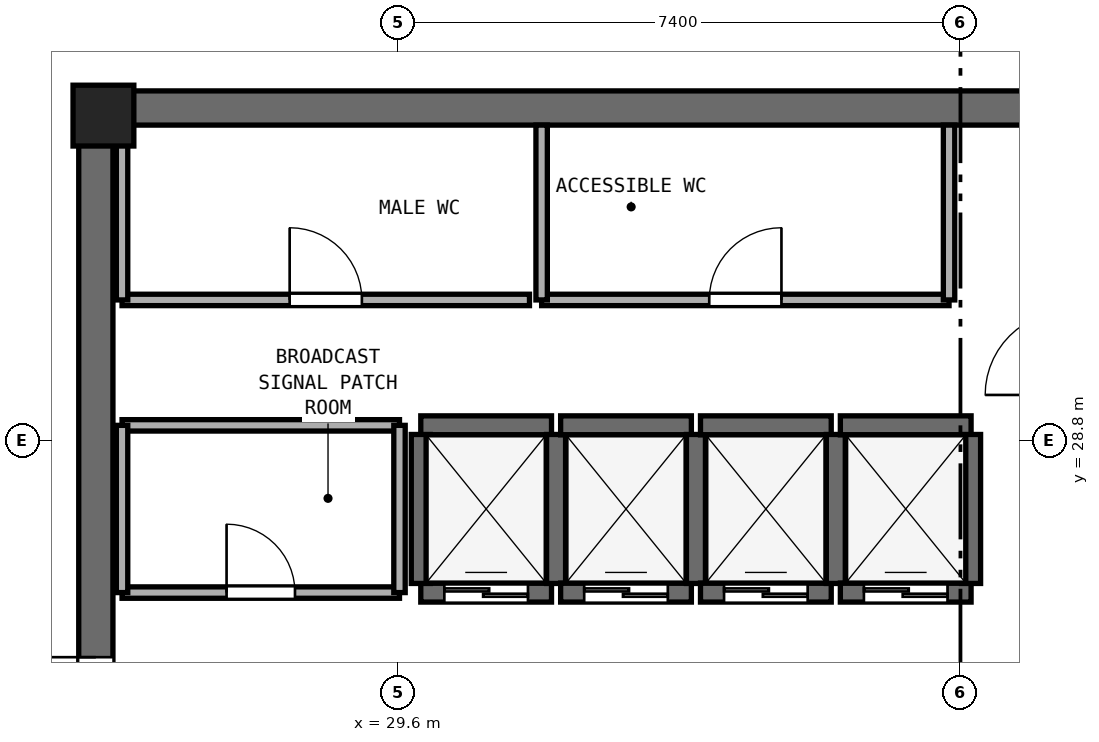
"""IFC4 building model, lengths in metres.
Left out: names, types, materials, properties, quantities, classifications, styles, units other than length and angle.
Written with IfcOpenShell. Run it as: python <this file> out.ifc"""

import sys

from ifc_helpers import new_model, si_unit, direction, frame, frame_2d, origin, origin_2d, place, context, subcontext, project, spatial, rectangle, extrude, element, fill, save


model = new_model("IFC4")
c1 = context("Model", 3, precision=1e-05, world=origin(), true_north=direction((0.0, 1.0)))
c2 = subcontext(c1, "Body", "Model", "MODEL_VIEW")
j1 = project(units=[si_unit("LENGTHUNIT", "METRE"), si_unit("PLANEANGLEUNIT", "RADIAN")], contexts=[c1])
p1 = place(None, origin())
s1 = spatial("IfcSite", under=j1, at=p1, CompositionType="ELEMENT")
p2 = place(p1, origin())
s2 = spatial("IfcBuilding", under=s1, at=p2, CompositionType="ELEMENT")
p3 = place(p2, frame((0.0, 0.0, 228.8)))
s3 = spatial("IfcBuildingStorey", under=s2, at=p3, CompositionType="ELEMENT", Elevation=228.8)
p4 = place(p3, frame((25.4, 33.175, 0.0), z_axis=(0.0, 0.0, 1.0), x_axis=(1.0, 0.0, 0.0)))
e1 = element("IfcWall", 1, at=p4, inside=s3, PredefinedType="SHEAR", context=c2, shape_type="SweptSolid", body=[
    extrude(rectangle(XDim=23.2, YDim=0.45, at=frame_2d((11.6, 0.0))), origin(), (0.0, 0.0, 1.0), 3.51),
])
p5 = place(p3, frame((25.625, 17.45, 0.0), z_axis=(0.0, 0.0, 1.0), x_axis=(0.0, 1.0, 0.0)))
e2 = element("IfcWall", 2, at=p5, inside=s3, PredefinedType="SHEAR", context=c2, shape_type="SweptSolid", body=[
    extrude(rectangle(XDim=15.5, YDim=0.45, at=frame_2d((7.75, 0.0))), origin(), (0.0, 0.0, 1.0), 3.51),
])
p6 = place(p5, frame((7.0, 0.0, 0.0)))
e3 = element("IfcOpeningElement", 3, at=p6, cuts=e2, PredefinedType="OPENING", context=c2, shape_type="SweptSolid", body=[
    extrude(rectangle(XDim=1.5, YDim=2.15, at=frame_2d((0.75, 1.075))), frame((0.0, 0.235, 0.0), z_axis=(0.0, -1.0, 0.0), x_axis=(1.0, 0.0, 0.0)), (0.0, 0.0, 1.0), 0.47),
])
p7 = place(p3, frame((25.725, 33.075, 0.0), z_axis=(0.0, 0.0, 1.0), x_axis=(1.0, 0.0, 0.0)))
e4 = element("IfcColumn", 4, at=p7, inside=s3, PredefinedType="PILASTER", context=c2, shape_type="SweptSolid", body=[
    extrude(rectangle(XDim=0.8, YDim=0.8, at=origin_2d()), origin(), (0.0, 0.0, 1.0), 3.8),
])
p8 = place(p3, frame((29.9, 26.8, 0.0), z_axis=(0.0, 0.0, 1.0), x_axis=(1.0, 0.0, 0.0)))
e5 = element("IfcWall", 5, at=p8, inside=s3, PredefinedType="SHEAR", context=c2, shape_type="SweptSolid", body=[
    extrude(rectangle(XDim=1.72, YDim=0.25, at=frame_2d((0.86, 0.0))), origin(), (0.0, 0.0, 1.0), 3.51),
])
p9 = place(p8, frame((0.31, 0.0, 0.0)))
e6 = element("IfcOpeningElement", 6, at=p9, cuts=e5, PredefinedType="OPENING", context=c2, shape_type="SweptSolid", body=[
    extrude(rectangle(XDim=1.1, YDim=2.15, at=frame_2d((0.55, 1.075))), frame((0.0, 0.135, 0.0), z_axis=(0.0, -1.0, 0.0), x_axis=(1.0, 0.0, 0.0)), (0.0, 0.0, 1.0), 0.27),
])
p10 = place(p3, frame((29.9, 29.0, 0.0), z_axis=(0.0, 0.0, 1.0), x_axis=(1.0, 0.0, 0.0)))
e7 = element("IfcWall", 7, at=p10, inside=s3, PredefinedType="SHEAR", context=c2, shape_type="SweptSolid", body=[
    extrude(rectangle(XDim=1.72, YDim=0.25, at=frame_2d((0.86, 0.0))), origin(), (0.0, 0.0, 1.0), 3.51),
])
for number, where, z_axis, x_axis in (
    (8, (29.9, 26.92, 0.0), (0.0, 0.0, 1.0), (0.0, 1.0, 0.0)),
    (9, (31.68, 26.92, 0.0), (0.0, 0.0, 1.0), (0.0, 1.0, 0.0)),
):
    element("IfcWall", number, at=place(p3, frame(where, z_axis=z_axis, x_axis=x_axis)), inside=s3, PredefinedType="SHEAR", context=c2, shape_type="SweptSolid", body=[
        extrude(rectangle(XDim=1.96, YDim=0.25, at=frame_2d((0.98, 0.0))), origin(), (0.0, 0.0, 1.0), 3.51),
    ])
p11 = place(p3, frame((31.74, 26.8, 0.0), z_axis=(0.0, 0.0, 1.0), x_axis=(1.0, 0.0, 0.0)))
e10 = element("IfcWall", 10, at=p11, inside=s3, PredefinedType="SHEAR", context=c2, shape_type="SweptSolid", body=[
    extrude(rectangle(XDim=1.72, YDim=0.25, at=frame_2d((0.86, 0.0))), origin(), (0.0, 0.0, 1.0), 3.51),
])
p12 = place(p11, frame((0.31, 0.0, 0.0)))
e11 = element("IfcOpeningElement", 11, at=p12, cuts=e10, PredefinedType="OPENING", context=c2, shape_type="SweptSolid", body=[
    extrude(rectangle(XDim=1.1, YDim=2.15, at=frame_2d((0.55, 1.075))), frame((0.0, 0.135, 0.0), z_axis=(0.0, -1.0, 0.0), x_axis=(1.0, 0.0, 0.0)), (0.0, 0.0, 1.0), 0.27),
])
p13 = place(p3, frame((31.74, 29.0, 0.0), z_axis=(0.0, 0.0, 1.0), x_axis=(1.0, 0.0, 0.0)))
e12 = element("IfcWall", 12, at=p13, inside=s3, PredefinedType="SHEAR", context=c2, shape_type="SweptSolid", body=[
    extrude(rectangle(XDim=1.72, YDim=0.25, at=frame_2d((0.86, 0.0))), origin(), (0.0, 0.0, 1.0), 3.51),
])
p14 = place(p3, frame((33.52, 26.92, 0.0), z_axis=(0.0, 0.0, 1.0), x_axis=(0.0, 1.0, 0.0)))
e13 = element("IfcWall", 13, at=p14, inside=s3, PredefinedType="SHEAR", context=c2, shape_type="SweptSolid", body=[
    extrude(rectangle(XDim=1.96, YDim=0.25, at=frame_2d((0.98, 0.0))), origin(), (0.0, 0.0, 1.0), 3.51),
])
p15 = place(p3, frame((33.58, 26.8, 0.0), z_axis=(0.0, 0.0, 1.0), x_axis=(1.0, 0.0, 0.0)))
e14 = element("IfcWall", 14, at=p15, inside=s3, PredefinedType="SHEAR", context=c2, shape_type="SweptSolid", body=[
    extrude(rectangle(XDim=1.72, YDim=0.25, at=frame_2d((0.86, 0.0))), origin(), (0.0, 0.0, 1.0), 3.51),
])
p16 = place(p15, frame((0.31, 0.0, 0.0)))
e15 = element("IfcOpeningElement", 15, at=p16, cuts=e14, PredefinedType="OPENING", context=c2, shape_type="SweptSolid", body=[
    extrude(rectangle(XDim=1.1, YDim=2.15, at=frame_2d((0.55, 1.075))), frame((0.0, 0.135, 0.0), z_axis=(0.0, -1.0, 0.0), x_axis=(1.0, 0.0, 0.0)), (0.0, 0.0, 1.0), 0.27),
])
p17 = place(p3, frame((33.58, 29.0, 0.0), z_axis=(0.0, 0.0, 1.0), x_axis=(1.0, 0.0, 0.0)))
e16 = element("IfcWall", 16, at=p17, inside=s3, PredefinedType="SHEAR", context=c2, shape_type="SweptSolid", body=[
    extrude(rectangle(XDim=1.72, YDim=0.25, at=frame_2d((0.86, 0.0))), origin(), (0.0, 0.0, 1.0), 3.51),
])
p18 = place(p3, frame((35.36, 26.92, 0.0), z_axis=(0.0, 0.0, 1.0), x_axis=(0.0, 1.0, 0.0)))
e17 = element("IfcWall", 17, at=p18, inside=s3, PredefinedType="SHEAR", context=c2, shape_type="SweptSolid", body=[
    extrude(rectangle(XDim=1.96, YDim=0.25, at=frame_2d((0.98, 0.0))), origin(), (0.0, 0.0, 1.0), 3.51),
])
p19 = place(p3, frame((35.42, 26.8, 0.0), z_axis=(0.0, 0.0, 1.0), x_axis=(1.0, 0.0, 0.0)))
e18 = element("IfcWall", 18, at=p19, inside=s3, PredefinedType="SHEAR", context=c2, shape_type="SweptSolid", body=[
    extrude(rectangle(XDim=1.72, YDim=0.25, at=frame_2d((0.86, 0.0))), origin(), (0.0, 0.0, 1.0), 3.51),
])
p20 = place(p19, frame((0.31, 0.0, 0.0)))
e19 = element("IfcOpeningElement", 19, at=p20, cuts=e18, PredefinedType="OPENING", context=c2, shape_type="SweptSolid", body=[
    extrude(rectangle(XDim=1.1, YDim=2.15, at=frame_2d((0.55, 1.075))), frame((0.0, 0.135, 0.0), z_axis=(0.0, -1.0, 0.0), x_axis=(1.0, 0.0, 0.0)), (0.0, 0.0, 1.0), 0.27),
])
p21 = place(p3, frame((35.42, 29.0, 0.0), z_axis=(0.0, 0.0, 1.0), x_axis=(1.0, 0.0, 0.0)))
e20 = element("IfcWall", 20, at=p21, inside=s3, PredefinedType="SHEAR", context=c2, shape_type="SweptSolid", body=[
    extrude(rectangle(XDim=1.72, YDim=0.25, at=frame_2d((0.86, 0.0))), origin(), (0.0, 0.0, 1.0), 3.51),
])
p22 = place(p3, frame((37.14, 26.92, 0.0), z_axis=(0.0, 0.0, 1.0), x_axis=(0.0, 1.0, 0.0)))
e21 = element("IfcWall", 21, at=p22, inside=s3, PredefinedType="SHEAR", context=c2, shape_type="SweptSolid", body=[
    extrude(rectangle(XDim=1.96, YDim=0.25, at=frame_2d((0.98, 0.0))), origin(), (0.0, 0.0, 1.0), 3.51),
])
p23 = place(p3, frame((25.97, 30.65, 0.0), z_axis=(0.0, 0.0, 1.0), x_axis=(1.0, 0.0, 0.0)))
e22 = element("IfcWall", 22, at=p23, inside=s3, PredefinedType="PARTITIONING", context=c2, shape_type="SweptSolid", body=[
    extrude(rectangle(XDim=5.36, YDim=0.15, at=frame_2d((2.68, 0.0))), origin(), (0.0, 0.0, 1.0), 3.51),
])
p24 = place(p23, frame((2.205, 0.0, 0.0)))
e23 = element("IfcOpeningElement", 23, at=p24, cuts=e22, PredefinedType="OPENING", context=c2, shape_type="SweptSolid", body=[
    extrude(rectangle(XDim=0.95, YDim=2.1, at=frame_2d((0.475, 1.05))), frame((0.0, 0.085, 0.0), z_axis=(0.0, -1.0, 0.0), x_axis=(1.0, 0.0, 0.0)), (0.0, 0.0, 1.0), 0.17),
])
p25 = place(p3, frame((25.97, 30.65, 0.0), z_axis=(0.0, 0.0, 1.0), x_axis=(0.0, 1.0, 0.0)))
e24 = element("IfcWall", 24, at=p25, inside=s3, PredefinedType="PARTITIONING", context=c2, shape_type="SweptSolid", body=[
    extrude(rectangle(XDim=2.3, YDim=0.15, at=frame_2d((1.15, 0.0))), origin(), (0.0, 0.0, 1.0), 2.61),
])
p26 = place(p3, frame((31.49, 30.65, 0.0), z_axis=(0.0, 0.0, 1.0), x_axis=(1.0, 0.0, 0.0)))
e25 = element("IfcWall", 25, at=p26, inside=s3, PredefinedType="PARTITIONING", context=c2, shape_type="SweptSolid", body=[
    extrude(rectangle(XDim=5.36, YDim=0.15, at=frame_2d((2.68, 0.0))), origin(), (0.0, 0.0, 1.0), 3.51),
])
p27 = place(p26, frame((2.205, 0.0, 0.0)))
e26 = element("IfcOpeningElement", 26, at=p27, cuts=e25, PredefinedType="OPENING", context=c2, shape_type="SweptSolid", body=[
    extrude(rectangle(XDim=0.95, YDim=2.1, at=frame_2d((0.475, 1.05))), frame((0.0, 0.085, 0.0), z_axis=(0.0, -1.0, 0.0), x_axis=(1.0, 0.0, 0.0)), (0.0, 0.0, 1.0), 0.17),
])
for number, where, z_axis, x_axis in (
    (27, (31.49, 30.65, 0.0), (0.0, 0.0, 1.0), (0.0, 1.0, 0.0)),
    (28, (36.85, 30.65, 0.0), (0.0, 0.0, 1.0), (0.0, 1.0, 0.0)),
):
    element("IfcWall", number, at=place(p3, frame(where, z_axis=z_axis, x_axis=x_axis)), inside=s3, PredefinedType="PARTITIONING", context=c2, shape_type="SweptSolid", body=[
        extrude(rectangle(XDim=2.3, YDim=0.15, at=frame_2d((1.15, 0.0))), origin(), (0.0, 0.0, 1.0), 3.51),
    ])
p28 = place(p3, frame((25.97, 26.8, 0.0), z_axis=(0.0, 0.0, 1.0), x_axis=(1.0, 0.0, 0.0)))
e29 = element("IfcWall", 29, at=p28, inside=s3, PredefinedType="PARTITIONING", context=c2, shape_type="SweptSolid", body=[
    extrude(rectangle(XDim=3.65, YDim=0.15, at=frame_2d((1.825, 0.0))), origin(), (0.0, 0.0, 1.0), 3.51),
])
p29 = place(p28, frame((1.375, 0.0, 0.0)))
e30 = element("IfcOpeningElement", 30, at=p29, cuts=e29, PredefinedType="OPENING", context=c2, shape_type="SweptSolid", body=[
    extrude(rectangle(XDim=0.9, YDim=2.1, at=frame_2d((0.45, 1.05))), frame((0.0, 0.085, 0.0), z_axis=(0.0, -1.0, 0.0), x_axis=(1.0, 0.0, 0.0)), (0.0, 0.0, 1.0), 0.17),
])
p30 = place(p3, frame((25.97, 29.0, 0.0), z_axis=(0.0, 0.0, 1.0), x_axis=(1.0, 0.0, 0.0)))
e31 = element("IfcWall", 31, at=p30, inside=s3, PredefinedType="PARTITIONING", context=c2, shape_type="SweptSolid", body=[
    extrude(rectangle(XDim=3.65, YDim=0.15, at=frame_2d((1.825, 0.0))), origin(), (0.0, 0.0, 1.0), 3.51),
])
p31 = place(p3, frame((25.97, 26.8, 0.0), z_axis=(0.0, 0.0, 1.0), x_axis=(0.0, 1.0, 0.0)))
e32 = element("IfcWall", 32, at=p31, inside=s3, PredefinedType="PARTITIONING", context=c2, shape_type="SweptSolid", body=[
    extrude(rectangle(XDim=2.2, YDim=0.15, at=frame_2d((1.1, 0.0))), origin(), (0.0, 0.0, 1.0), 2.61),
])
p32 = place(p3, frame((29.62, 26.8, 0.0), z_axis=(0.0, 0.0, 1.0), x_axis=(0.0, 1.0, 0.0)))
e33 = element("IfcWall", 33, at=p32, inside=s3, PredefinedType="PARTITIONING", context=c2, shape_type="SweptSolid", body=[
    extrude(rectangle(XDim=2.2, YDim=0.15, at=frame_2d((1.1, 0.0))), origin(), (0.0, 0.0, 1.0), 3.51),
])
p33 = place(p9, origin())
e34 = element("IfcDoor", 34, at=p33, inside=s3, OperationType="DOUBLE_DOOR_SLIDING", PredefinedType="DOOR", context=c2, shape_type="SweptSolid", body=[
    extrude(rectangle(XDim=1.1, YDim=2.15, at=frame_2d((0.55, 1.075))), frame((0.0, 0.025, 0.0), z_axis=(0.0, -1.0, 0.0), x_axis=(1.0, 0.0, 0.0)), (0.0, 0.0, 1.0), 0.05),
])
fill(e6, e34)
p34 = place(p12, origin())
e35 = element("IfcDoor", 35, at=p34, inside=s3, OperationType="DOUBLE_DOOR_SLIDING", PredefinedType="DOOR", context=c2, shape_type="SweptSolid", body=[
    extrude(rectangle(XDim=1.1, YDim=2.15, at=frame_2d((0.55, 1.075))), frame((0.0, 0.025, 0.0), z_axis=(0.0, -1.0, 0.0), x_axis=(1.0, 0.0, 0.0)), (0.0, 0.0, 1.0), 0.05),
])
fill(e11, e35)
p35 = place(p16, origin())
e36 = element("IfcDoor", 36, at=p35, inside=s3, OperationType="DOUBLE_DOOR_SLIDING", PredefinedType="DOOR", context=c2, shape_type="SweptSolid", body=[
    extrude(rectangle(XDim=1.1, YDim=2.15, at=frame_2d((0.55, 1.075))), frame((0.0, 0.025, 0.0), z_axis=(0.0, -1.0, 0.0), x_axis=(1.0, 0.0, 0.0)), (0.0, 0.0, 1.0), 0.05),
])
fill(e15, e36)
p36 = place(p20, origin())
e37 = element("IfcDoor", 37, at=p36, inside=s3, OperationType="DOUBLE_DOOR_SLIDING", PredefinedType="DOOR", context=c2, shape_type="SweptSolid", body=[
    extrude(rectangle(XDim=1.1, YDim=2.15, at=frame_2d((0.55, 1.075))), frame((0.0, 0.025, 0.0), z_axis=(0.0, -1.0, 0.0), x_axis=(1.0, 0.0, 0.0)), (0.0, 0.0, 1.0), 0.05),
])
fill(e19, e37)
p37 = place(p6, origin())
e38 = element("IfcDoor", 38, at=p37, inside=s3, OperationType="DOUBLE_DOOR_SINGLE_SWING", PredefinedType="DOOR", context=c2, shape_type="SweptSolid", body=[
    extrude(rectangle(XDim=1.5, YDim=2.15, at=frame_2d((0.75, 1.075))), frame((0.0, 0.025, 0.0), z_axis=(0.0, -1.0, 0.0), x_axis=(1.0, 0.0, 0.0)), (0.0, 0.0, 1.0), 0.05),
])
fill(e3, e38)
p38 = place(p24, origin())
e39 = element("IfcDoor", 39, at=p38, inside=s3, OperationType="SINGLE_SWING_LEFT", PredefinedType="DOOR", context=c2, shape_type="SweptSolid", body=[
    extrude(rectangle(XDim=0.95, YDim=2.1, at=frame_2d((0.475, 1.05))), frame((0.0, 0.025, 0.0), z_axis=(0.0, -1.0, 0.0), x_axis=(1.0, 0.0, 0.0)), (0.0, 0.0, 1.0), 0.05),
])
fill(e23, e39)
p39 = place(p27, origin())
e40 = element("IfcDoor", 40, at=p39, inside=s3, OperationType="SINGLE_SWING_RIGHT", PredefinedType="DOOR", context=c2, shape_type="SweptSolid", body=[
    extrude(rectangle(XDim=0.95, YDim=2.1, at=frame_2d((0.475, 1.05))), frame((0.0, 0.025, 0.0), z_axis=(0.0, -1.0, 0.0), x_axis=(1.0, 0.0, 0.0)), (0.0, 0.0, 1.0), 0.05),
])
fill(e26, e40)
p40 = place(p29, origin())
e41 = element("IfcDoor", 41, at=p40, inside=s3, OperationType="SINGLE_SWING_LEFT", PredefinedType="DOOR", context=c2, shape_type="SweptSolid", body=[
    extrude(rectangle(XDim=0.9, YDim=2.1, at=frame_2d((0.45, 1.05))), frame((0.0, 0.025, 0.0), z_axis=(0.0, -1.0, 0.0), x_axis=(1.0, 0.0, 0.0)), (0.0, 0.0, 1.0), 0.05),
])
fill(e30, e41)
save(model, sys.argv[1])
